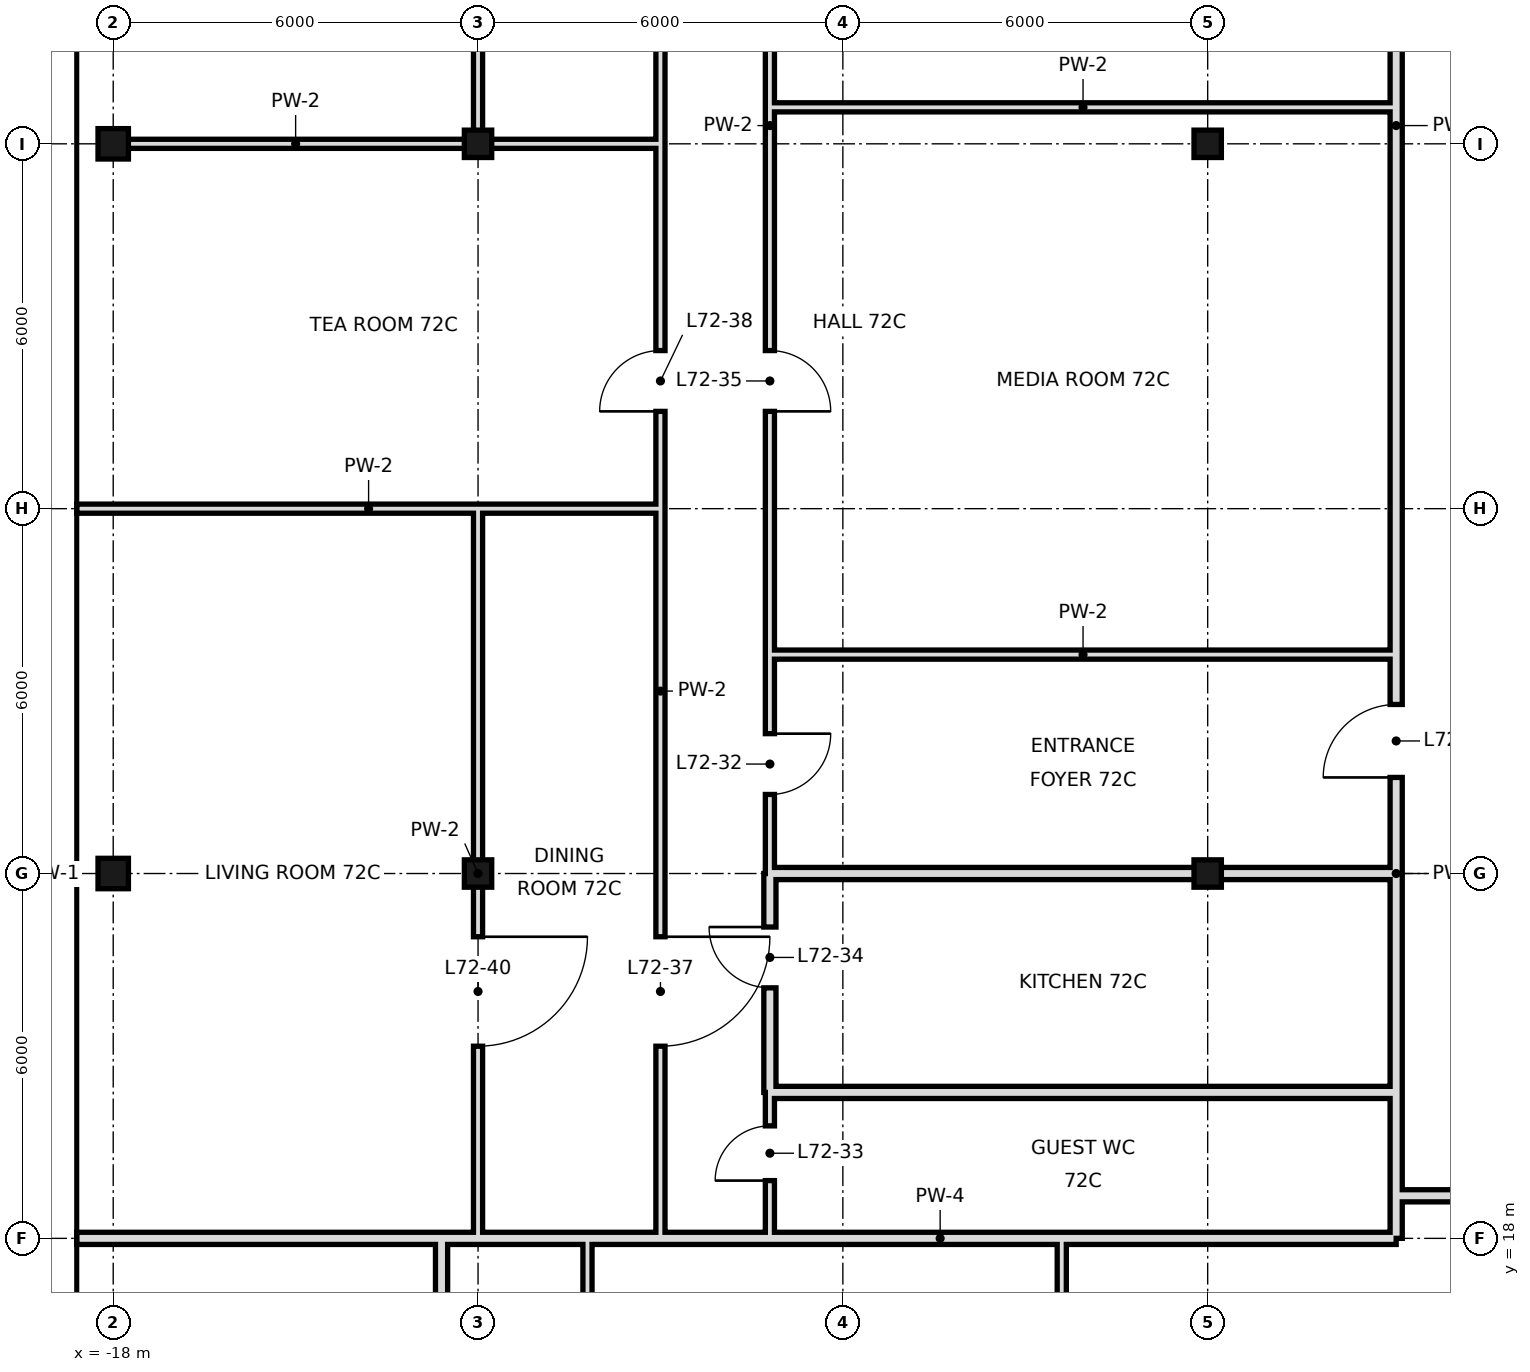
"""IFC4 building model, lengths in metres.
Left out: names, types, materials, properties, quantities, classifications, styles, units other than length and angle.
Written with IfcOpenShell. Run it as: python <this file> out.ifc"""

import sys

from ifc_helpers import new_model, si_unit, direction, frame, frame_2d, origin, origin_2d, place, context, subcontext, project, spatial, rectangle, hollow_rectangle, extrude, element, fill, save


model = new_model("IFC4")
c1 = context("Model", 3, precision=1e-05, world=origin(), true_north=direction((0.0, 1.0)))
c2 = subcontext(c1, "Body", "Model", "MODEL_VIEW")
j1 = project(units=[si_unit("LENGTHUNIT", "METRE"), si_unit("PLANEANGLEUNIT", "RADIAN")], contexts=[c1])
p1 = place(None, origin())
s1 = spatial("IfcSite", under=j1, at=p1, CompositionType="ELEMENT")
p2 = place(p1, origin())
s2 = spatial("IfcBuilding", under=s1, at=p2, CompositionType="ELEMENT")
p3 = place(p2, frame((0.0, 0.0, 305.2)))
s3 = spatial("IfcBuildingStorey", under=s2, at=p3, CompositionType="ELEMENT", Elevation=305.2)
for number, where, z_axis, x_axis in (
    (1, (-18.0, 24.0, 0.0), (0.0, 0.0, 1.0), (1.0, 0.0, 0.0)),
    (2, (-18.0, 36.0, 0.0), (0.0, 0.0, 1.0), (1.0, 0.0, 0.0)),
):
    element("IfcColumn", number, at=place(p3, frame(where, z_axis=z_axis, x_axis=x_axis)), inside=s3, PredefinedType="COLUMN", context=c2, shape_type="SweptSolid", body=[
        extrude(hollow_rectangle(XDim=0.5, YDim=0.5, WallThickness=0.025, at=origin_2d()), origin(), (0.0, 0.0, 1.0), 3.6),
    ])
for number, where, z_axis, x_axis in (
    (3, (-12.0, 24.0, 0.0), (0.0, 0.0, 1.0), (1.0, 0.0, 0.0)),
    (4, (-12.0, 36.0, 0.0), (0.0, 0.0, 1.0), (1.0, 0.0, 0.0)),
    (5, (0.0, 24.0, 0.0), (0.0, 0.0, 1.0), (1.0, 0.0, 0.0)),
    (6, (0.0, 36.0, 0.0), (0.0, 0.0, 1.0), (1.0, 0.0, 0.0)),
):
    element("IfcColumn", number, at=place(p3, frame(where, z_axis=z_axis, x_axis=x_axis)), inside=s3, PredefinedType="COLUMN", context=c2, shape_type="SweptSolid", body=[
        extrude(hollow_rectangle(XDim=0.45, YDim=0.45, WallThickness=0.022, at=origin_2d()), origin(), (0.0, 0.0, 1.0), 3.6),
    ])
p4 = place(p3, frame((-10.2, 10.8, 0.0), z_axis=(0.0, 0.0, 1.0), x_axis=(0.0, 1.0, 0.0)))
e7 = element("IfcWall", 7, at=p4, inside=s3, PredefinedType="PARTITIONING", context=c2, shape_type="SweptSolid", body=[
    extrude(rectangle(XDim=7.2, YDim=0.15, at=frame_2d((3.6, 0.0))), origin(), (0.0, 0.0, 1.0), 3.42),
])
p5 = place(p3, frame((-12.0, 18.0, 0.0), z_axis=(0.0, 0.0, 1.0), x_axis=(0.0, 1.0, 0.0)))
e8 = element("IfcWall", 8, at=p5, inside=s3, PredefinedType="PARTITIONING", context=c2, shape_type="SweptSolid", body=[
    extrude(rectangle(XDim=12.0, YDim=0.15, at=frame_2d((6.0, 0.0))), origin(), (0.0, 0.0, 1.0), 2.72),
])
p6 = place(p5, frame((3.16, 0.0, 0.0)))
e9 = element("IfcOpeningElement", 9, at=p6, cuts=e8, PredefinedType="OPENING", context=c2, shape_type="SweptSolid", body=[
    extrude(rectangle(XDim=1.8, YDim=2.4, at=frame_2d((0.9, 1.2))), frame((0.0, 0.085, 0.0), z_axis=(0.0, -1.0, 0.0), x_axis=(1.0, 0.0, 0.0)), (0.0, 0.0, 1.0), 0.17),
])
p7 = place(p3, frame((-12.0, 36.0, 0.0), z_axis=(0.0, 0.0, 1.0), x_axis=(0.0, 1.0, 0.0)))
e10 = element("IfcWall", 10, at=p7, inside=s3, PredefinedType="PARTITIONING", context=c2, shape_type="SweptSolid", body=[
    extrude(rectangle(XDim=8.4, YDim=0.15, at=frame_2d((4.2, 0.0))), origin(), (0.0, 0.0, 1.0), 2.72),
])
p8 = place(p7, frame((6.75, 0.0, 0.0)))
e11 = element("IfcOpeningElement", 11, at=p8, cuts=e10, PredefinedType="OPENING", context=c2, shape_type="SweptSolid", body=[
    extrude(rectangle(XDim=0.9, YDim=2.4, at=frame_2d((0.45, 1.2))), frame((0.0, 0.085, 0.0), z_axis=(0.0, -1.0, 0.0), x_axis=(1.0, 0.0, 0.0)), (0.0, 0.0, 1.0), 0.17),
])
p9 = place(p3, frame((-12.6, 10.8, 0.0), z_axis=(0.0, 0.0, 1.0), x_axis=(0.0, 1.0, 0.0)))
e12 = element("IfcWall", 12, at=p9, inside=s3, PredefinedType="SOLIDWALL", context=c2, shape_type="SweptSolid", body=[
    extrude(rectangle(XDim=7.2, YDim=0.2, at=frame_2d((3.6, 0.0))), origin(), (0.0, 0.0, 1.0), 2.97),
])
p10 = place(p3, frame((-2.4, 10.8, 0.0), z_axis=(0.0, 0.0, 1.0), x_axis=(0.0, 1.0, 0.0)))
e13 = element("IfcWall", 13, at=p10, inside=s3, PredefinedType="PARTITIONING", context=c2, shape_type="SweptSolid", body=[
    extrude(rectangle(XDim=7.2, YDim=0.15, at=frame_2d((3.6, 0.0))), origin(), (0.0, 0.0, 1.0), 3.42),
])
p11 = place(p3, frame((-7.2, 20.4, 0.0), z_axis=(0.0, 0.0, 1.0), x_axis=(0.0, 1.0, 0.0)))
e14 = element("IfcWall", 14, at=p11, inside=s3, PredefinedType="SOLIDWALL", context=c2, shape_type="SweptSolid", body=[
    extrude(rectangle(XDim=3.6, YDim=0.2, at=frame_2d((1.8, 0.0))), origin(), (0.0, 0.0, 1.0), 2.72),
])
p12 = place(p11, frame((1.72, 0.0, 0.0)))
e15 = element("IfcOpeningElement", 15, at=p12, cuts=e14, PredefinedType="OPENING", context=c2, shape_type="SweptSolid", body=[
    extrude(rectangle(XDim=1.0, YDim=2.4, at=frame_2d((0.5, 1.2))), frame((0.0, 0.11, 0.0), z_axis=(0.0, -1.0, 0.0), x_axis=(1.0, 0.0, 0.0)), (0.0, 0.0, 1.0), 0.22),
])
p13 = place(p3, frame((-7.2, 24.0, 0.0), z_axis=(0.0, 0.0, 1.0), x_axis=(0.0, 1.0, 0.0)))
e16 = element("IfcWall", 16, at=p13, inside=s3, PredefinedType="PARTITIONING", context=c2, shape_type="SweptSolid", body=[
    extrude(rectangle(XDim=24.6, YDim=0.15, at=frame_2d((12.3, 0.0))), origin(), (0.0, 0.0, 1.0), 3.42),
])
p14 = place(p13, frame((1.3, 0.0, 0.0)))
e17 = element("IfcOpeningElement", 17, at=p14, cuts=e16, PredefinedType="OPENING", context=c2, shape_type="SweptSolid", body=[
    extrude(rectangle(XDim=1.0, YDim=2.4, at=frame_2d((0.5, 1.2))), frame((0.0, 0.085, 0.0), z_axis=(0.0, -1.0, 0.0), x_axis=(1.0, 0.0, 0.0)), (0.0, 0.0, 1.0), 0.17),
])
p15 = place(p13, frame((7.6, 0.0, 0.0)))
e18 = element("IfcOpeningElement", 18, at=p15, cuts=e16, PredefinedType="OPENING", context=c2, shape_type="SweptSolid", body=[
    extrude(rectangle(XDim=1.0, YDim=2.4, at=frame_2d((0.5, 1.2))), frame((0.0, 0.085, 0.0), z_axis=(0.0, -1.0, 0.0), x_axis=(1.0, 0.0, 0.0)), (0.0, 0.0, 1.0), 0.17),
])
p16 = place(p13, frame((17.8, 0.0, 0.0)))
e19 = element("IfcOpeningElement", 19, at=p16, cuts=e16, PredefinedType="OPENING", context=c2, shape_type="SweptSolid", body=[
    extrude(rectangle(XDim=1.0, YDim=2.4, at=frame_2d((0.5, 1.2))), frame((0.0, 0.085, 0.0), z_axis=(0.0, -1.0, 0.0), x_axis=(1.0, 0.0, 0.0)), (0.0, 0.0, 1.0), 0.17),
])
p17 = place(p3, frame((-7.2, 18.0, 0.0), z_axis=(0.0, 0.0, 1.0), x_axis=(0.0, 1.0, 0.0)))
e20 = element("IfcWall", 20, at=p17, inside=s3, PredefinedType="PARTITIONING", context=c2, shape_type="SweptSolid", body=[
    extrude(rectangle(XDim=2.4, YDim=0.15, at=frame_2d((1.2, 0.0))), origin(), (0.0, 0.0, 1.0), 3.42),
])
p18 = place(p17, frame((0.95, 0.0, 0.0)))
e21 = element("IfcOpeningElement", 21, at=p18, cuts=e20, PredefinedType="OPENING", context=c2, shape_type="SweptSolid", body=[
    extrude(rectangle(XDim=0.9, YDim=2.4, at=frame_2d((0.45, 1.2))), frame((0.0, 0.085, 0.0), z_axis=(0.0, -1.0, 0.0), x_axis=(1.0, 0.0, 0.0)), (0.0, 0.0, 1.0), 0.17),
])
p19 = place(p3, frame((-9.0, 18.0, 0.0), z_axis=(0.0, 0.0, 1.0), x_axis=(0.0, 1.0, 0.0)))
e22 = element("IfcWall", 22, at=p19, inside=s3, PredefinedType="PARTITIONING", context=c2, shape_type="SweptSolid", body=[
    extrude(rectangle(XDim=18.0, YDim=0.15, at=frame_2d((9.0, 0.0))), origin(), (0.0, 0.0, 1.0), 3.42),
])
p20 = place(p19, frame((3.16, 0.0, 0.0)))
e23 = element("IfcOpeningElement", 23, at=p20, cuts=e22, PredefinedType="OPENING", context=c2, shape_type="SweptSolid", body=[
    extrude(rectangle(XDim=1.8, YDim=2.4, at=frame_2d((0.9, 1.2))), frame((0.0, 0.085, 0.0), z_axis=(0.0, -1.0, 0.0), x_axis=(1.0, 0.0, 0.0)), (0.0, 0.0, 1.0), 0.17),
])
p21 = place(p19, frame((13.6, 0.0, 0.0)))
e24 = element("IfcOpeningElement", 24, at=p21, cuts=e22, PredefinedType="OPENING", context=c2, shape_type="SweptSolid", body=[
    extrude(rectangle(XDim=1.0, YDim=2.4, at=frame_2d((0.5, 1.2))), frame((0.0, 0.085, 0.0), z_axis=(0.0, -1.0, 0.0), x_axis=(1.0, 0.0, 0.0)), (0.0, 0.0, 1.0), 0.17),
])
p22 = place(p3, frame((-9.0, 36.0, 0.0), z_axis=(0.0, 0.0, 1.0), x_axis=(0.0, 1.0, 0.0)))
e25 = element("IfcWall", 25, at=p22, inside=s3, PredefinedType="PARTITIONING", context=c2, shape_type="SweptSolid", body=[
    extrude(rectangle(XDim=8.4, YDim=0.15, at=frame_2d((4.2, 0.0))), origin(), (0.0, 0.0, 1.0), 3.42),
])
p23 = place(p3, frame((3.1, 18.7, 0.0), z_axis=(0.0, 0.0, 1.0), x_axis=(0.0, 1.0, 0.0)))
e26 = element("IfcWall", 26, at=p23, inside=s3, PredefinedType="SOLIDWALL", context=c2, shape_type="SweptSolid", body=[
    extrude(rectangle(XDim=1.7, YDim=0.2, at=frame_2d((0.85, 0.0))), origin(), (0.0, 0.0, 1.0), 3.42),
])
p24 = place(p3, frame((3.1, 24.0, 0.0), z_axis=(0.0, 0.0, 1.0), x_axis=(0.0, 1.0, 0.0)))
e27 = element("IfcWall", 27, at=p24, inside=s3, PredefinedType="SOLIDWALL", context=c2, shape_type="SweptSolid", body=[
    extrude(rectangle(XDim=24.6, YDim=0.2, at=frame_2d((12.3, 0.0))), origin(), (0.0, 0.0, 1.0), 2.72),
])
p25 = place(p24, frame((1.58, 0.0, 0.0)))
e28 = element("IfcOpeningElement", 28, at=p25, cuts=e27, PredefinedType="OPENING", context=c2, shape_type="SweptSolid", body=[
    extrude(rectangle(XDim=1.2, YDim=2.4, at=frame_2d((0.6, 1.2))), frame((0.0, 0.11, 0.0), z_axis=(0.0, -1.0, 0.0), x_axis=(1.0, 0.0, 0.0)), (0.0, 0.0, 1.0), 0.22),
])
p26 = place(p3, frame((3.1, 20.4, 0.0), z_axis=(0.0, 0.0, 1.0), x_axis=(0.0, 1.0, 0.0)))
e29 = element("IfcWall", 29, at=p26, inside=s3, PredefinedType="SOLIDWALL", context=c2, shape_type="SweptSolid", body=[
    extrude(rectangle(XDim=3.6, YDim=0.2, at=frame_2d((1.8, 0.0))), origin(), (0.0, 0.0, 1.0), 3.42),
])
p27 = place(p3, frame((3.1, 18.0, 0.0), z_axis=(0.0, 0.0, 1.0), x_axis=(0.0, 1.0, 0.0)))
e30 = element("IfcWall", 30, at=p27, inside=s3, PredefinedType="SOLIDWALL", context=c2, shape_type="SweptSolid", body=[
    extrude(rectangle(XDim=0.7, YDim=0.2, at=frame_2d((0.35, 0.0))), origin(), (0.0, 0.0, 1.0), 2.97),
])
p28 = place(p3, frame((-18.6, 18.0, 0.0), z_axis=(0.0, 0.0, 1.0), x_axis=(1.0, 0.0, 0.0)))
e31 = element("IfcWall", 31, at=p28, inside=s3, PredefinedType="SOLIDWALL", context=c2, shape_type="SweptSolid", body=[
    extrude(rectangle(XDim=6.0, YDim=0.2, at=frame_2d((3.0, 0.0))), origin(), (0.0, 0.0, 1.0), 2.72),
])
p29 = place(p3, frame((-12.6, 18.0, 0.0), z_axis=(0.0, 0.0, 1.0), x_axis=(1.0, 0.0, 0.0)))
e32 = element("IfcWall", 32, at=p29, inside=s3, PredefinedType="SOLIDWALL", context=c2, shape_type="SweptSolid", body=[
    extrude(rectangle(XDim=15.7, YDim=0.2, at=frame_2d((7.85, 0.0))), origin(), (0.0, 0.0, 1.0), 2.72),
])
p30 = place(p3, frame((3.1, 18.7, 0.0), z_axis=(0.0, 0.0, 1.0), x_axis=(1.0, 0.0, 0.0)))
e33 = element("IfcWall", 33, at=p30, inside=s3, PredefinedType="SOLIDWALL", context=c2, shape_type="SweptSolid", body=[
    extrude(rectangle(XDim=17.3, YDim=0.2, at=frame_2d((8.65, 0.0))), origin(), (0.0, 0.0, 1.0), 2.72),
])
p31 = place(p30, frame((6.12, 0.0, 0.0)))
e34 = element("IfcOpeningElement", 34, at=p31, cuts=e33, PredefinedType="OPENING", context=c2, shape_type="SweptSolid", body=[
    extrude(rectangle(XDim=1.2, YDim=2.4, at=frame_2d((0.6, 1.2))), frame((0.0, 0.11, 0.0), z_axis=(0.0, -1.0, 0.0), x_axis=(1.0, 0.0, 0.0)), (0.0, 0.0, 1.0), 0.22),
])
p32 = place(p30, frame((13.7, 0.0, 0.0)))
e35 = element("IfcOpeningElement", 35, at=p32, cuts=e33, PredefinedType="OPENING", context=c2, shape_type="SweptSolid", body=[
    extrude(rectangle(XDim=1.2, YDim=2.4, at=frame_2d((0.6, 1.2))), frame((0.0, 0.11, 0.0), z_axis=(0.0, -1.0, 0.0), x_axis=(1.0, 0.0, 0.0)), (0.0, 0.0, 1.0), 0.22),
])
for number, where, z_axis, x_axis in (
    (36, (-7.2, 20.4, 0.0), (0.0, 0.0, 1.0), (1.0, 0.0, 0.0)),
    (37, (-7.2, 24.0, 0.0), (0.0, 0.0, 1.0), (1.0, 0.0, 0.0)),
):
    element("IfcWall", number, at=place(p3, frame(where, z_axis=z_axis, x_axis=x_axis)), inside=s3, PredefinedType="SOLIDWALL", context=c2, shape_type="SweptSolid", body=[
        extrude(rectangle(XDim=10.3, YDim=0.2, at=frame_2d((5.15, 0.0))), origin(), (0.0, 0.0, 1.0), 2.72),
    ])
p33 = place(p3, frame((-7.2, 27.6, 0.0), z_axis=(0.0, 0.0, 1.0), x_axis=(1.0, 0.0, 0.0)))
e38 = element("IfcWall", 38, at=p33, inside=s3, PredefinedType="PARTITIONING", context=c2, shape_type="SweptSolid", body=[
    extrude(rectangle(XDim=10.3, YDim=0.15, at=frame_2d((5.15, 0.0))), origin(), (0.0, 0.0, 1.0), 3.42),
])
p34 = place(p3, frame((-18.6, 30.0, 0.0), z_axis=(0.0, 0.0, 1.0), x_axis=(1.0, 0.0, 0.0)))
e39 = element("IfcWall", 39, at=p34, inside=s3, PredefinedType="PARTITIONING", context=c2, shape_type="SweptSolid", body=[
    extrude(rectangle(XDim=9.6, YDim=0.15, at=frame_2d((4.8, 0.0))), origin(), (0.0, 0.0, 1.0), 2.72),
])
p35 = place(p3, frame((-18.0, 36.0, 0.0), z_axis=(0.0, 0.0, 1.0), x_axis=(1.0, 0.0, 0.0)))
e40 = element("IfcWall", 40, at=p35, inside=s3, PredefinedType="PARTITIONING", context=c2, shape_type="SweptSolid", body=[
    extrude(rectangle(XDim=6.0, YDim=0.15, at=frame_2d((3.0, 0.0))), origin(), (0.0, 0.0, 1.0), 2.97),
])
p36 = place(p3, frame((-12.0, 36.0, 0.0), z_axis=(0.0, 0.0, 1.0), x_axis=(1.0, 0.0, 0.0)))
e41 = element("IfcWall", 41, at=p36, inside=s3, PredefinedType="PARTITIONING", context=c2, shape_type="SweptSolid", body=[
    extrude(rectangle(XDim=3.0, YDim=0.15, at=frame_2d((1.5, 0.0))), origin(), (0.0, 0.0, 1.0), 2.72),
])
p37 = place(p3, frame((-7.2, 36.6, 0.0), z_axis=(0.0, 0.0, 1.0), x_axis=(1.0, 0.0, 0.0)))
e42 = element("IfcWall", 42, at=p37, inside=s3, PredefinedType="PARTITIONING", context=c2, shape_type="SweptSolid", body=[
    extrude(rectangle(XDim=10.3, YDim=0.15, at=frame_2d((5.15, 0.0))), origin(), (0.0, 0.0, 1.0), 3.42),
])
p38 = place(p14, origin())
e43 = element("IfcDoor", 43, at=p38, inside=s3, OperationType="SINGLE_SWING_RIGHT", PredefinedType="DOOR", context=c2, shape_type="SweptSolid", body=[
    extrude(rectangle(XDim=1.0, YDim=2.4, at=frame_2d((0.5, 1.2))), frame((0.0, 0.025, 0.0), z_axis=(0.0, -1.0, 0.0), x_axis=(1.0, 0.0, 0.0)), (0.0, 0.0, 1.0), 0.05),
])
fill(e17, e43)
p39 = place(p18, origin())
e44 = element("IfcDoor", 44, at=p39, inside=s3, OperationType="SINGLE_SWING_LEFT", PredefinedType="DOOR", context=c2, shape_type="SweptSolid", body=[
    extrude(rectangle(XDim=0.9, YDim=2.4, at=frame_2d((0.45, 1.2))), frame((0.0, 0.025, 0.0), z_axis=(0.0, -1.0, 0.0), x_axis=(1.0, 0.0, 0.0)), (0.0, 0.0, 1.0), 0.05),
])
fill(e21, e44)
p40 = place(p12, frame((1.0, 0.0, 0.0), z_axis=(0.0, 0.0, 1.0), x_axis=(-1.0, 0.0, 0.0)))
e45 = element("IfcDoor", 45, at=p40, inside=s3, OperationType="SINGLE_SWING_LEFT", PredefinedType="DOOR", context=c2, shape_type="SweptSolid", body=[
    extrude(rectangle(XDim=1.0, YDim=2.4, at=frame_2d((0.5, 1.2))), frame((0.0, 0.025, 0.0), z_axis=(0.0, -1.0, 0.0), x_axis=(1.0, 0.0, 0.0)), (0.0, 0.0, 1.0), 0.05),
])
fill(e15, e45)
p41 = place(p15, frame((1.0, 0.0, 0.0), z_axis=(0.0, 0.0, 1.0), x_axis=(-1.0, 0.0, 0.0)))
e46 = element("IfcDoor", 46, at=p41, inside=s3, OperationType="SINGLE_SWING_RIGHT", PredefinedType="DOOR", context=c2, shape_type="SweptSolid", body=[
    extrude(rectangle(XDim=1.0, YDim=2.4, at=frame_2d((0.5, 1.2))), frame((0.0, 0.025, 0.0), z_axis=(0.0, -1.0, 0.0), x_axis=(1.0, 0.0, 0.0)), (0.0, 0.0, 1.0), 0.05),
])
fill(e18, e46)
p42 = place(p20, origin())
e47 = element("IfcDoor", 47, at=p42, inside=s3, OperationType="SINGLE_SWING_RIGHT", PredefinedType="DOOR", context=c2, shape_type="SweptSolid", body=[
    extrude(rectangle(XDim=1.8, YDim=2.4, at=frame_2d((0.9, 1.2))), frame((0.0, 0.025, 0.0), z_axis=(0.0, -1.0, 0.0), x_axis=(1.0, 0.0, 0.0)), (0.0, 0.0, 1.0), 0.05),
])
fill(e23, e47)
p43 = place(p21, origin())
e48 = element("IfcDoor", 48, at=p43, inside=s3, OperationType="SINGLE_SWING_LEFT", PredefinedType="DOOR", context=c2, shape_type="SweptSolid", body=[
    extrude(rectangle(XDim=1.0, YDim=2.4, at=frame_2d((0.5, 1.2))), frame((0.0, 0.025, 0.0), z_axis=(0.0, -1.0, 0.0), x_axis=(1.0, 0.0, 0.0)), (0.0, 0.0, 1.0), 0.05),
])
fill(e24, e48)
p44 = place(p6, origin())
e49 = element("IfcDoor", 49, at=p44, inside=s3, OperationType="SINGLE_SWING_RIGHT", PredefinedType="DOOR", context=c2, shape_type="SweptSolid", body=[
    extrude(rectangle(XDim=1.8, YDim=2.4, at=frame_2d((0.9, 1.2))), frame((0.0, 0.025, 0.0), z_axis=(0.0, -1.0, 0.0), x_axis=(1.0, 0.0, 0.0)), (0.0, 0.0, 1.0), 0.05),
])
fill(e9, e49)
p45 = place(p25, origin())
e50 = element("IfcDoor", 50, at=p45, inside=s3, OperationType="SINGLE_SWING_LEFT", PredefinedType="DOOR", context=c2, shape_type="SweptSolid", body=[
    extrude(rectangle(XDim=1.2, YDim=2.4, at=frame_2d((0.6, 1.2))), frame((0.0, 0.025, 0.0), z_axis=(0.0, -1.0, 0.0), x_axis=(1.0, 0.0, 0.0)), (0.0, 0.0, 1.0), 0.05),
])
fill(e28, e50)
save(model, sys.argv[1])
